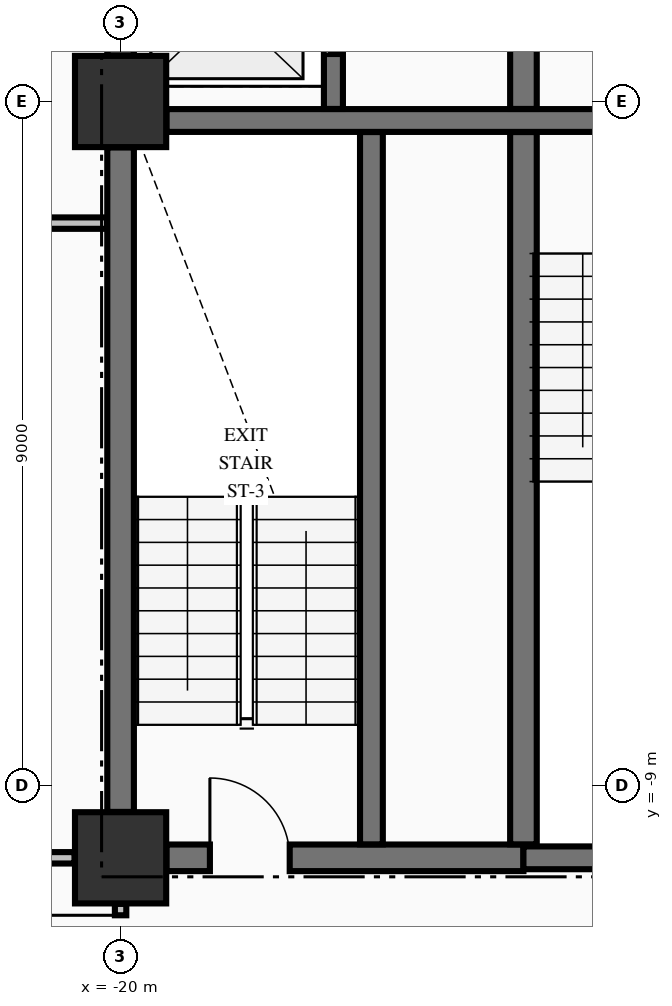
"""IFC4 building model, lengths in metres.
Left out: names, types, materials, properties, quantities, classifications, styles, units other than length and angle.
Written with IfcOpenShell. Run it as: python <this file> out.ifc"""

import sys

from ifc_helpers import new_model, si_unit, direction, frame, frame_2d, origin, origin_2d, place, context, subcontext, project, spatial, rectangle, extrude, element, fill, save


model = new_model("IFC4")
c1 = context("Model", 3, precision=1e-05, world=origin(), true_north=direction((0.0, 1.0)))
c2 = subcontext(c1, "Body", "Model", "MODEL_VIEW")
j1 = project(units=[si_unit("LENGTHUNIT", "METRE"), si_unit("PLANEANGLEUNIT", "RADIAN")], contexts=[c1])
p1 = place(None, origin())
s1 = spatial("IfcSite", under=j1, at=p1, CompositionType="ELEMENT")
p2 = place(p1, origin())
s2 = spatial("IfcBuilding", under=s1, at=p2, CompositionType="ELEMENT")
p3 = place(p2, frame((0.0, 0.0, 34.34)))
s3 = spatial("IfcBuildingStorey", under=s2, at=p3, CompositionType="ELEMENT", Elevation=34.34)
for number, where, z_axis, x_axis in (
    (1, (-20.0, -9.95, -0.3), (0.0, 0.0, 1.0), (1.0, 0.0, 0.0)),
    (2, (-20.0, 0.0, -0.3), (0.0, 0.0, 1.0), (1.0, 0.0, 0.0)),
):
    element("IfcColumn", number, at=place(p3, frame(where, z_axis=z_axis, x_axis=x_axis)), inside=s3, PredefinedType="COLUMN", context=c2, shape_type="SweptSolid", body=[
        extrude(rectangle(XDim=1.2, YDim=1.2, at=origin_2d()), origin(), (0.0, 0.0, 1.0), 3.62),
    ])
p4 = place(p3, frame((-19.396, -9.95, 0.0), z_axis=(0.0, 0.0, 1.0), x_axis=(1.0, 0.0, 0.0)))
e3 = element("IfcWall", 3, at=p4, inside=s3, PredefinedType="SHEAR", context=c2, shape_type="SweptSolid", body=[
    extrude(rectangle(XDim=4.696, YDim=0.35, at=frame_2d((2.348, 0.0))), origin(), (0.0, 0.0, 1.0), 3.32),
])
p5 = place(p4, frame((0.571, 0.0, 0.0)))
e4 = element("IfcOpeningElement", 4, at=p5, cuts=e3, PredefinedType="OPENING", context=c2, shape_type="SweptSolid", body=[
    extrude(rectangle(XDim=1.05, YDim=2.15, at=frame_2d((0.525, 1.075))), frame((0.0, 0.185, 0.0), z_axis=(0.0, -1.0, 0.0), x_axis=(1.0, 0.0, 0.0)), (0.0, 0.0, 1.0), 0.37),
])
p6 = place(p3, frame((-14.7, -9.95, 0.0), z_axis=(0.0, 0.0, 1.0), x_axis=(1.0, 0.0, 0.0)))
e5 = element("IfcWall", 5, at=p6, inside=s3, PredefinedType="SHEAR", context=c2, shape_type="SweptSolid", body=[
    extrude(rectangle(XDim=3.096, YDim=0.3, at=frame_2d((1.548, 0.0))), origin(), (0.0, 0.0, 1.0), 3.32),
])
p7 = place(p3, frame((-19.396, -0.25, 0.0), z_axis=(0.0, 0.0, 1.0), x_axis=(1.0, 0.0, 0.0)))
e6 = element("IfcWall", 6, at=p7, inside=s3, PredefinedType="SHEAR", context=c2, shape_type="SweptSolid", body=[
    extrude(rectangle(XDim=7.792, YDim=0.3, at=frame_2d((3.896, 0.0))), origin(), (0.0, 0.0, 1.0), 3.32),
])
p8 = place(p7, frame((5.696, 0.0, 0.0)))
e7 = element("IfcOpeningElement", 7, at=p8, cuts=e6, PredefinedType="OPENING", context=c2, shape_type="SweptSolid", body=[
    extrude(rectangle(XDim=1.1, YDim=2.15, at=frame_2d((0.55, 1.075))), frame((0.0, 0.16, 0.0), z_axis=(0.0, -1.0, 0.0), x_axis=(1.0, 0.0, 0.0)), (0.0, 0.0, 1.0), 0.32),
])
p9 = place(p3, frame((-23.835, -9.95, 0.0), z_axis=(0.0, 0.0, 1.0), x_axis=(1.0, 0.0, 0.0)))
e8 = element("IfcWall", 8, at=p9, inside=s3, PredefinedType="PARTITIONING", context=c2, shape_type="SweptSolid", body=[
    extrude(rectangle(XDim=3.229, YDim=0.15, at=frame_2d((1.615, 0.0))), origin(), (0.0, 0.0, 1.0), 3.32),
])
p10 = place(p9, frame((1.36, 0.0, 0.0)))
e9 = element("IfcOpeningElement", 9, at=p10, cuts=e8, PredefinedType="OPENING", context=c2, shape_type="SweptSolid", body=[
    extrude(rectangle(XDim=0.95, YDim=2.15, at=frame_2d((0.475, 1.075))), frame((0.0, 0.085, 0.0), z_axis=(0.0, -1.0, 0.0), x_axis=(1.0, 0.0, 0.0)), (0.0, 0.0, 1.0), 0.17),
])
p11 = place(p3, frame((-23.835, -1.6, 0.0), z_axis=(0.0, 0.0, 1.0), x_axis=(1.0, 0.0, 0.0)))
e10 = element("IfcWall", 10, at=p11, inside=s3, PredefinedType="PARTITIONING", context=c2, shape_type="SweptSolid", body=[
    extrude(rectangle(XDim=3.657, YDim=0.15, at=frame_2d((1.829, 0.0))), origin(), (0.0, 0.0, 1.0), 3.32),
])
p12 = place(p3, frame((-20.0, -9.346, 0.0), z_axis=(0.0, 0.0, 1.0), x_axis=(0.0, 1.0, 0.0)))
e11 = element("IfcWall", 11, at=p12, inside=s3, PredefinedType="SHEAR", context=c2, shape_type="SweptSolid", body=[
    extrude(rectangle(XDim=8.742, YDim=0.35, at=frame_2d((4.371, 0.0))), origin(), (0.0, 0.0, 1.0), 3.32),
])
p13 = place(p3, frame((-20.0, 0.604, 0.0), z_axis=(0.0, 0.0, 1.0), x_axis=(0.0, 1.0, 0.0)))
e12 = element("IfcWall", 12, at=p13, inside=s3, PredefinedType="SHEAR", context=c2, shape_type="SweptSolid", body=[
    extrude(rectangle(XDim=1.869, YDim=0.35, at=frame_2d((0.935, 0.0))), origin(), (0.0, 0.0, 1.0), 3.32),
])
p14 = place(p3, frame((-17.2, -0.098, 0.0), z_axis=(0.0, 0.0, 1.0), x_axis=(0.0, 1.0, 0.0)))
e13 = element("IfcWall", 13, at=p14, inside=s3, PredefinedType="SOLIDWALL", context=c2, shape_type="SweptSolid", body=[
    extrude(rectangle(XDim=2.571, YDim=0.25, at=frame_2d((1.285, 0.0))), origin(), (0.0, 0.0, 1.0), 3.32),
])
p15 = place(p14, frame((0.723, 0.0, 0.0)))
e14 = element("IfcOpeningElement", 14, at=p15, cuts=e13, PredefinedType="OPENING", context=c2, shape_type="SweptSolid", body=[
    extrude(rectangle(XDim=1.1, YDim=2.2, at=frame_2d((0.55, 1.1))), frame((0.0, 0.135, 0.0), z_axis=(0.0, -1.0, 0.0), x_axis=(1.0, 0.0, 0.0)), (0.0, 0.0, 1.0), 0.27),
])
p16 = place(p3, frame((-16.7, -9.773, 0.0), z_axis=(0.0, 0.0, 1.0), x_axis=(0.0, 1.0, 0.0)))
e15 = element("IfcWall", 15, at=p16, inside=s3, PredefinedType="SHEAR", context=c2, shape_type="SweptSolid", body=[
    extrude(rectangle(XDim=9.371, YDim=0.3, at=frame_2d((4.686, 0.0))), origin(), (0.0, 0.0, 1.0), 3.32),
])
p17 = place(p3, frame((-14.7, -9.773, 0.0), z_axis=(0.0, 0.0, 1.0), x_axis=(0.0, 1.0, 0.0)))
e16 = element("IfcWall", 16, at=p17, inside=s3, PredefinedType="SHEAR", context=c2, shape_type="SweptSolid", body=[
    extrude(rectangle(XDim=9.371, YDim=0.35, at=frame_2d((4.686, 0.0))), origin(), (0.0, 0.0, 1.0), 3.32),
])
p18 = place(p3, frame((-14.7, -0.098, 0.0), z_axis=(0.0, 0.0, 1.0), x_axis=(0.0, 1.0, 0.0)))
e17 = element("IfcWall", 17, at=p18, inside=s3, PredefinedType="SHEAR", context=c2, shape_type="SweptSolid", body=[
    extrude(rectangle(XDim=2.846, YDim=0.35, at=frame_2d((1.423, 0.0))), origin(), (0.0, 0.0, 1.0), 3.32),
])
p19 = place(p3, frame((-20.0, -12.122, 0.0), z_axis=(0.0, 0.0, 1.0), x_axis=(0.0, 1.0, 0.0)))
e18 = element("IfcWall", 18, at=p19, inside=s3, PredefinedType="PARTITIONING", context=c2, shape_type="SweptSolid", body=[
    extrude(rectangle(XDim=1.566, YDim=0.15, at=frame_2d((0.783, 0.0))), origin(), (0.0, 0.0, 1.0), 3.32),
])
p20 = place(p19, frame((0.466, 0.0, 0.0)))
e19 = element("IfcOpeningElement", 19, at=p20, cuts=e18, PredefinedType="OPENING", context=c2, shape_type="SweptSolid", body=[
    extrude(rectangle(XDim=0.95, YDim=2.15, at=frame_2d((0.475, 1.075))), frame((0.0, 0.085, 0.0), z_axis=(0.0, -1.0, 0.0), x_axis=(1.0, 0.0, 0.0)), (0.0, 0.0, 1.0), 0.17),
])
p21 = place(p5, origin())
e20 = element("IfcDoor", 20, at=p21, inside=s3, OperationType="SINGLE_SWING_LEFT", PredefinedType="DOOR", context=c2, shape_type="SweptSolid", body=[
    extrude(rectangle(XDim=1.05, YDim=2.15, at=frame_2d((0.525, 1.075))), frame((0.0, 0.025, 0.0), z_axis=(0.0, -1.0, 0.0), x_axis=(1.0, 0.0, 0.0)), (0.0, 0.0, 1.0), 0.05),
])
fill(e4, e20)
p22 = place(p15, origin())
e21 = element("IfcDoor", 21, at=p22, inside=s3, OperationType="SLIDING_TO_LEFT", PredefinedType="DOOR", context=c2, shape_type="SweptSolid", body=[
    extrude(rectangle(XDim=1.1, YDim=2.2, at=frame_2d((0.55, 1.1))), frame((0.0, 0.025, 0.0), z_axis=(0.0, -1.0, 0.0), x_axis=(1.0, 0.0, 0.0)), (0.0, 0.0, 1.0), 0.05),
])
fill(e14, e21)
p23 = place(p20, origin())
e22 = element("IfcDoor", 22, at=p23, inside=s3, OperationType="SINGLE_SWING_RIGHT", PredefinedType="DOOR", context=c2, shape_type="SweptSolid", body=[
    extrude(rectangle(XDim=0.95, YDim=2.15, at=frame_2d((0.475, 1.075))), frame((0.0, 0.025, 0.0), z_axis=(0.0, -1.0, 0.0), x_axis=(1.0, 0.0, 0.0)), (0.0, 0.0, 1.0), 0.05),
])
fill(e19, e22)
save(model, sys.argv[1])
